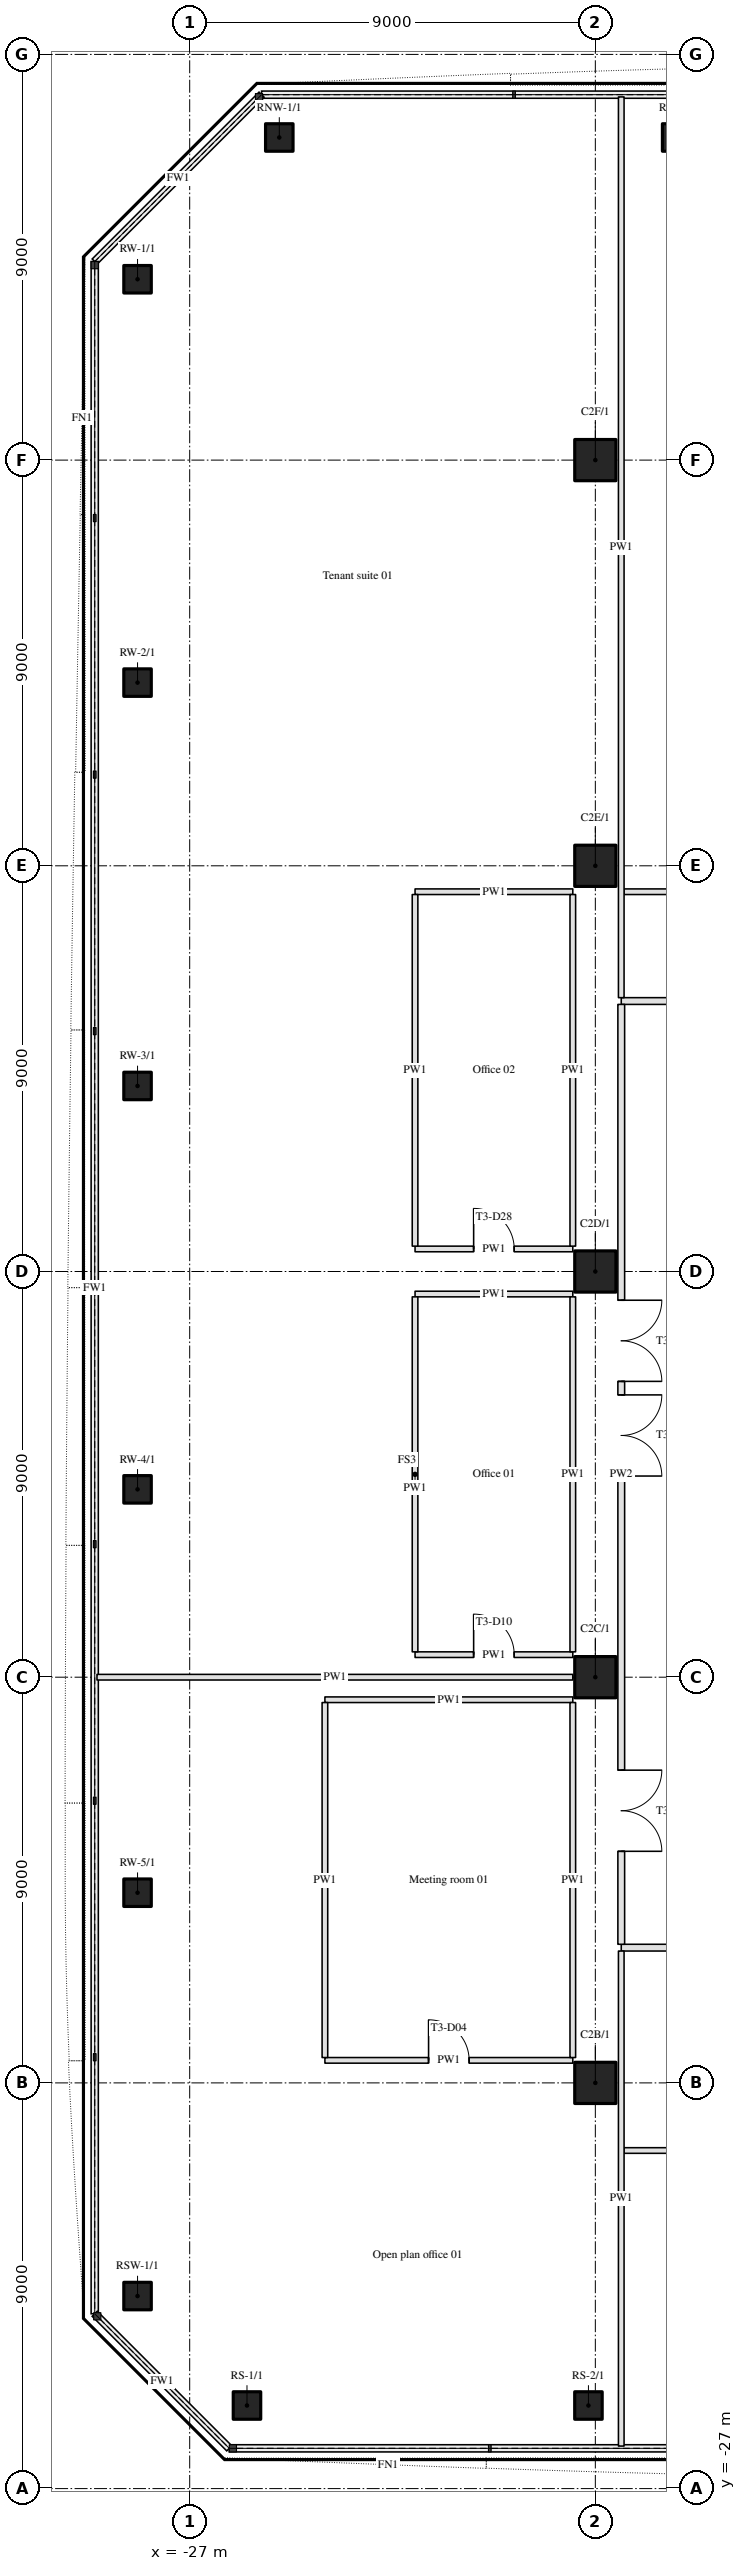
"""IFC4 building model, lengths in metres.
Left out: names, types, materials, properties, quantities, classifications, styles, units other than length and angle.
Written with IfcOpenShell. Run it as: python <this file> out.ifc"""

import sys

from ifc_helpers import new_model, si_unit, direction, frame, frame_2d, origin, origin_2d, place, context, subcontext, project, spatial, rectangle, hollow_circle, extrude, element, fill, save


model = new_model("IFC4")
c1 = context("Model", 3, precision=1e-05, world=origin(), true_north=direction((0.0, 1.0)))
c2 = subcontext(c1, "Body", "Model", "MODEL_VIEW")
j1 = project(units=[si_unit("LENGTHUNIT", "METRE"), si_unit("PLANEANGLEUNIT", "RADIAN")], contexts=[c1])
p1 = place(None, origin())
s1 = spatial("IfcSite", under=j1, at=p1, CompositionType="ELEMENT")
p2 = place(p1, origin())
s2 = spatial("IfcBuilding", under=s1, at=p2, CompositionType="ELEMENT")
p3 = place(p2, frame((0.0, 0.0, 53.7)))
s3 = spatial("IfcBuildingStorey", under=s2, at=p3, CompositionType="ELEMENT", Elevation=53.7)
for number, where, z_axis, x_axis in (
    (1, (-18.0, -18.0, 0.0), (0.0, 0.0, 1.0), (1.0, 0.0, 0.0)),
    (2, (-18.0, -9.0, 0.0), (0.0, 0.0, 1.0), (1.0, 0.0, 0.0)),
    (3, (-18.0, 0.0, 0.0), (0.0, 0.0, 1.0), (1.0, 0.0, 0.0)),
    (4, (-18.0, 9.0, 0.0), (0.0, 0.0, 1.0), (1.0, 0.0, 0.0)),
    (5, (-18.0, 18.0, 0.0), (0.0, 0.0, 1.0), (1.0, 0.0, 0.0)),
):
    element("IfcColumn", number, at=place(p3, frame(where, z_axis=z_axis, x_axis=x_axis)), inside=s3, PredefinedType="COLUMN", context=c2, shape_type="SweptSolid", body=[
        extrude(hollow_circle(Radius=0.457, WallThickness=0.05, at=origin_2d()), origin(), (0.0, 0.0, 1.0), 3.9),
    ])
for number, where, z_axis, x_axis in (
    (6, (-25.729, -25.157, 0.0), (0.0, 0.0, 1.0), (1.0, 0.0, 0.0)),
    (7, (-18.153, -25.157, 0.0), (0.0, 0.0, 1.0), (1.0, 0.0, 0.0)),
    (8, (-16.207, 25.157, 0.0), (0.0, 0.0, 1.0), (1.0, 0.0, 0.0)),
    (9, (-25.012, 25.157, 0.0), (0.0, 0.0, 1.0), (1.0, 0.0, 0.0)),
    (10, (-28.157, 22.012, 0.0), (0.0, 0.0, 1.0), (1.0, 0.0, 0.0)),
    (11, (-28.157, 13.064, 0.0), (0.0, 0.0, 1.0), (1.0, 0.0, 0.0)),
    (12, (-28.157, 4.116, 0.0), (0.0, 0.0, 1.0), (1.0, 0.0, 0.0)),
    (13, (-28.157, -4.833, 0.0), (0.0, 0.0, 1.0), (1.0, 0.0, 0.0)),
    (14, (-28.157, -13.781, 0.0), (0.0, 0.0, 1.0), (1.0, 0.0, 0.0)),
    (15, (-28.157, -22.729, 0.0), (0.0, 0.0, 1.0), (1.0, 0.0, 0.0)),
):
    element("IfcColumn", number, at=place(p3, frame(where, z_axis=z_axis, x_axis=x_axis)), inside=s3, PredefinedType="COLUMN", context=c2, shape_type="SweptSolid", body=[
        extrude(hollow_circle(Radius=0.305, WallThickness=0.03, at=origin_2d()), origin(), (0.0, 0.0, 1.0), 3.9),
    ])
p4 = place(p3, frame((-17.363, -19.5, 0.0), z_axis=(0.0, 0.0, 1.0), x_axis=(1.0, 0.0, 0.0)))
e16 = element("IfcWall", 16, at=p4, inside=s3, PredefinedType="PARTITIONING", context=c2, shape_type="SweptSolid", body=[
    extrude(rectangle(XDim=7.863, YDim=0.125, at=frame_2d((3.931, 0.0))), origin(), (0.0, 0.0, 1.0), 2.96),
])
p5 = place(p4, frame((3.481, 0.0, 0.0)))
e17 = element("IfcOpeningElement", 17, at=p5, cuts=e16, PredefinedType="OPENING", context=c2, shape_type="SweptSolid", body=[
    extrude(rectangle(XDim=0.9, YDim=2.1, at=frame_2d((0.45, 1.05))), frame((0.0, 0.073, 0.0), z_axis=(0.0, -1.0, 0.0), x_axis=(1.0, 0.0, 0.0)), (0.0, 0.0, 1.0), 0.145),
])
p6 = place(p3, frame((-24.0, -17.5, 0.0), z_axis=(0.0, 0.0, 1.0), x_axis=(1.0, 0.0, 0.0)))
e18 = element("IfcWall", 18, at=p6, inside=s3, PredefinedType="PARTITIONING", context=c2, shape_type="SweptSolid", body=[
    extrude(rectangle(XDim=5.5, YDim=0.125, at=frame_2d((2.75, 0.0))), origin(), (0.0, 0.0, 1.0), 2.96),
])
p7 = place(p6, frame((2.3, 0.0, 0.0)))
e19 = element("IfcOpeningElement", 19, at=p7, cuts=e18, PredefinedType="OPENING", context=c2, shape_type="SweptSolid", body=[
    extrude(rectangle(XDim=0.9, YDim=2.1, at=frame_2d((0.45, 1.05))), frame((0.0, 0.073, 0.0), z_axis=(0.0, -1.0, 0.0), x_axis=(1.0, 0.0, 0.0)), (0.0, 0.0, 1.0), 0.145),
])
p8 = place(p3, frame((-17.425, -15.0, 0.0), z_axis=(0.0, 0.0, 1.0), x_axis=(1.0, 0.0, 0.0)))
e20 = element("IfcWall", 20, at=p8, inside=s3, PredefinedType="PARTITIONING", context=c2, shape_type="SweptSolid", body=[
    extrude(rectangle(XDim=34.85, YDim=0.15, at=frame_2d((17.425, 0.0))), origin(), (0.0, 0.0, 1.0), 2.96),
])
p9 = place(p8, frame((25.238, 0.0, 0.0)))
e21 = element("IfcOpeningElement", 21, at=p9, cuts=e20, PredefinedType="OPENING", context=c2, shape_type="SweptSolid", body=[
    extrude(rectangle(XDim=1.8, YDim=2.1, at=frame_2d((0.9, 1.05))), frame((0.0, 0.085, 0.0), z_axis=(0.0, -1.0, 0.0), x_axis=(1.0, 0.0, 0.0)), (0.0, 0.0, 1.0), 0.17),
])
p10 = place(p8, frame((23.137, 0.0, 0.0)))
e22 = element("IfcOpeningElement", 22, at=p10, cuts=e20, PredefinedType="OPENING", context=c2, shape_type="SweptSolid", body=[
    extrude(rectangle(XDim=1.8, YDim=2.1, at=frame_2d((0.9, 1.05))), frame((0.0, 0.085, 0.0), z_axis=(0.0, -1.0, 0.0), x_axis=(1.0, 0.0, 0.0)), (0.0, 0.0, 1.0), 0.17),
])
p11 = place(p3, frame((-24.0, -9.5, 0.0), z_axis=(0.0, 0.0, 1.0), x_axis=(1.0, 0.0, 0.0)))
e23 = element("IfcWall", 23, at=p11, inside=s3, PredefinedType="PARTITIONING", context=c2, shape_type="SweptSolid", body=[
    extrude(rectangle(XDim=5.5, YDim=0.125, at=frame_2d((2.75, 0.0))), origin(), (0.0, 0.0, 1.0), 2.96),
])
p12 = place(p3, frame((-29.057, -9.0, 0.0), z_axis=(0.0, 0.0, 1.0), x_axis=(1.0, 0.0, 0.0)))
e24 = element("IfcWall", 24, at=p12, inside=s3, PredefinedType="PARTITIONING", context=c2, shape_type="SweptSolid", body=[
    extrude(rectangle(XDim=10.557, YDim=0.125, at=frame_2d((5.278, 0.0))), origin(), (0.0, 0.0, 1.0), 2.96),
])
p13 = place(p3, frame((-22.0, -8.5, 0.0), z_axis=(0.0, 0.0, 1.0), x_axis=(1.0, 0.0, 0.0)))
e25 = element("IfcWall", 25, at=p13, inside=s3, PredefinedType="PARTITIONING", context=c2, shape_type="SweptSolid", body=[
    extrude(rectangle(XDim=3.5, YDim=0.125, at=frame_2d((1.75, 0.0))), origin(), (0.0, 0.0, 1.0), 2.96),
])
p14 = place(p13, frame((1.3, 0.0, 0.0)))
e26 = element("IfcOpeningElement", 26, at=p14, cuts=e25, PredefinedType="OPENING", context=c2, shape_type="SweptSolid", body=[
    extrude(rectangle(XDim=0.9, YDim=2.1, at=frame_2d((0.45, 1.05))), frame((0.0, 0.073, 0.0), z_axis=(0.0, -1.0, 0.0), x_axis=(1.0, 0.0, 0.0)), (0.0, 0.0, 1.0), 0.145),
])
p15 = place(p3, frame((-22.0, -0.5, 0.0), z_axis=(0.0, 0.0, 1.0), x_axis=(1.0, 0.0, 0.0)))
e27 = element("IfcWall", 27, at=p15, inside=s3, PredefinedType="PARTITIONING", context=c2, shape_type="SweptSolid", body=[
    extrude(rectangle(XDim=3.5, YDim=0.125, at=frame_2d((1.75, 0.0))), origin(), (0.0, 0.0, 1.0), 2.96),
])
p16 = place(p3, frame((-22.0, 0.5, 0.0), z_axis=(0.0, 0.0, 1.0), x_axis=(1.0, 0.0, 0.0)))
e28 = element("IfcWall", 28, at=p16, inside=s3, PredefinedType="PARTITIONING", context=c2, shape_type="SweptSolid", body=[
    extrude(rectangle(XDim=3.5, YDim=0.125, at=frame_2d((1.75, 0.0))), origin(), (0.0, 0.0, 1.0), 2.96),
])
p17 = place(p16, frame((1.3, 0.0, 0.0)))
e29 = element("IfcOpeningElement", 29, at=p17, cuts=e28, PredefinedType="OPENING", context=c2, shape_type="SweptSolid", body=[
    extrude(rectangle(XDim=0.9, YDim=2.1, at=frame_2d((0.45, 1.05))), frame((0.0, 0.073, 0.0), z_axis=(0.0, -1.0, 0.0), x_axis=(1.0, 0.0, 0.0)), (0.0, 0.0, 1.0), 0.145),
])
p18 = place(p3, frame((-7.35, 6.0, 0.0), z_axis=(0.0, 0.0, 1.0), x_axis=(-1.0, 0.0, 0.0)))
e30 = element("IfcWall", 30, at=p18, inside=s3, PredefinedType="PARTITIONING", context=c2, shape_type="SweptSolid", body=[
    extrude(rectangle(XDim=10.075, YDim=0.15, at=frame_2d((5.038, 0.0))), origin(), (0.0, 0.0, 1.0), 2.96),
])
p19 = place(p18, frame((2.325, 0.0, 0.0)))
e31 = element("IfcOpeningElement", 31, at=p19, cuts=e30, PredefinedType="OPENING", context=c2, shape_type="SweptSolid", body=[
    extrude(rectangle(XDim=1.0, YDim=2.1, at=frame_2d((0.5, 1.05))), frame((0.0, 0.085, 0.0), z_axis=(0.0, -1.0, 0.0), x_axis=(1.0, 0.0, 0.0)), (0.0, 0.0, 1.0), 0.17),
])
p20 = place(p18, frame((7.413, 0.0, 0.0)))
e32 = element("IfcOpeningElement", 32, at=p20, cuts=e30, PredefinedType="OPENING", context=c2, shape_type="SweptSolid", body=[
    extrude(rectangle(XDim=0.9, YDim=2.1, at=frame_2d((0.45, 1.05))), frame((0.0, 0.085, 0.0), z_axis=(0.0, -1.0, 0.0), x_axis=(1.0, 0.0, 0.0)), (0.0, 0.0, 1.0), 0.17),
])
p21 = place(p3, frame((-22.0, 8.425, 0.0), z_axis=(0.0, 0.0, 1.0), x_axis=(1.0, 0.0, 0.0)))
e33 = element("IfcWall", 33, at=p21, inside=s3, PredefinedType="PARTITIONING", context=c2, shape_type="SweptSolid", body=[
    extrude(rectangle(XDim=3.5, YDim=0.125, at=frame_2d((1.75, 0.0))), origin(), (0.0, 0.0, 1.0), 2.96),
])
p22 = place(p3, frame((-17.363, 8.425, 0.0), z_axis=(0.0, 0.0, 1.0), x_axis=(1.0, 0.0, 0.0)))
e34 = element("IfcWall", 34, at=p22, inside=s3, PredefinedType="PARTITIONING", context=c2, shape_type="SweptSolid", body=[
    extrude(rectangle(XDim=4.288, YDim=0.125, at=frame_2d((2.144, 0.0))), origin(), (0.0, 0.0, 1.0), 2.96),
])
for number, where, z_axis, x_axis in (
    (35, (-24.0, -17.438, 0.0), (0.0, 0.0, 1.0), (0.0, 1.0, 0.0)),
    (36, (-22.0, -8.438, 0.0), (0.0, 0.0, 1.0), (0.0, 1.0, 0.0)),
):
    element("IfcWall", number, at=place(p3, frame(where, z_axis=z_axis, x_axis=x_axis)), inside=s3, PredefinedType="PARTITIONING", context=c2, shape_type="SweptSolid", body=[
        extrude(rectangle(XDim=7.875, YDim=0.125, at=frame_2d((3.938, 0.0))), origin(), (0.0, 0.0, 1.0), 2.96),
    ])
p23 = place(p3, frame((-22.0, 0.562, 0.0), z_axis=(0.0, 0.0, 1.0), x_axis=(0.0, 1.0, 0.0)))
e37 = element("IfcWall", 37, at=p23, inside=s3, PredefinedType="PARTITIONING", context=c2, shape_type="SweptSolid", body=[
    extrude(rectangle(XDim=7.8, YDim=0.125, at=frame_2d((3.9, 0.0))), origin(), (0.0, 0.0, 1.0), 2.96),
])
for number, where, z_axis, x_axis in (
    (38, (-18.5, -17.438, 0.0), (0.0, 0.0, 1.0), (0.0, 1.0, 0.0)),
    (39, (-18.5, -8.438, 0.0), (0.0, 0.0, 1.0), (0.0, 1.0, 0.0)),
):
    element("IfcWall", number, at=place(p3, frame(where, z_axis=z_axis, x_axis=x_axis)), inside=s3, PredefinedType="PARTITIONING", context=c2, shape_type="SweptSolid", body=[
        extrude(rectangle(XDim=7.875, YDim=0.125, at=frame_2d((3.938, 0.0))), origin(), (0.0, 0.0, 1.0), 2.96),
    ])
p24 = place(p3, frame((-18.5, 0.562, 0.0), z_axis=(0.0, 0.0, 1.0), x_axis=(0.0, 1.0, 0.0)))
e40 = element("IfcWall", 40, at=p24, inside=s3, PredefinedType="PARTITIONING", context=c2, shape_type="SweptSolid", body=[
    extrude(rectangle(XDim=7.8, YDim=0.125, at=frame_2d((3.9, 0.0))), origin(), (0.0, 0.0, 1.0), 2.96),
])
p25 = place(p3, frame((-17.425, -26.057, 0.0), z_axis=(0.0, 0.0, 1.0), x_axis=(0.0, 1.0, 0.0)))
e41 = element("IfcWall", 41, at=p25, inside=s3, PredefinedType="PARTITIONING", context=c2, shape_type="SweptSolid", body=[
    extrude(rectangle(XDim=10.982, YDim=0.125, at=frame_2d((5.491, 0.0))), origin(), (0.0, 0.0, 1.0), 2.96),
])
p26 = place(p3, frame((-17.425, 5.925, 0.0), z_axis=(0.0, 0.0, 1.0), x_axis=(0.0, -1.0, 0.0)))
e42 = element("IfcWall", 42, at=p26, inside=s3, PredefinedType="PARTITIONING", context=c2, shape_type="SweptSolid", body=[
    extrude(rectangle(XDim=20.85, YDim=0.15, at=frame_2d((10.425, 0.0))), origin(), (0.0, 0.0, 1.0), 2.96),
])
p27 = place(p26, frame((16.988, 0.0, 0.0)))
e43 = element("IfcOpeningElement", 43, at=p27, cuts=e42, PredefinedType="OPENING", context=c2, shape_type="SweptSolid", body=[
    extrude(rectangle(XDim=1.8, YDim=2.1, at=frame_2d((0.9, 1.05))), frame((0.0, 0.085, 0.0), z_axis=(0.0, -1.0, 0.0), x_axis=(1.0, 0.0, 0.0)), (0.0, 0.0, 1.0), 0.17),
])
p28 = place(p26, frame((6.562, 0.0, 0.0)))
e44 = element("IfcOpeningElement", 44, at=p28, cuts=e42, PredefinedType="OPENING", context=c2, shape_type="SweptSolid", body=[
    extrude(rectangle(XDim=1.8, YDim=2.1, at=frame_2d((0.9, 1.05))), frame((0.0, 0.085, 0.0), z_axis=(0.0, -1.0, 0.0), x_axis=(1.0, 0.0, 0.0)), (0.0, 0.0, 1.0), 0.17),
])
p29 = place(p26, frame((8.663, 0.0, 0.0)))
e45 = element("IfcOpeningElement", 45, at=p29, cuts=e42, PredefinedType="OPENING", context=c2, shape_type="SweptSolid", body=[
    extrude(rectangle(XDim=1.8, YDim=2.1, at=frame_2d((0.9, 1.05))), frame((0.0, 0.085, 0.0), z_axis=(0.0, -1.0, 0.0), x_axis=(1.0, 0.0, 0.0)), (0.0, 0.0, 1.0), 0.17),
])
p30 = place(p3, frame((-17.425, 6.075, 0.0), z_axis=(0.0, 0.0, 1.0), x_axis=(0.0, 1.0, 0.0)))
e46 = element("IfcWall", 46, at=p30, inside=s3, PredefinedType="PARTITIONING", context=c2, shape_type="SweptSolid", body=[
    extrude(rectangle(XDim=19.982, YDim=0.125, at=frame_2d((9.991, 0.0))), origin(), (0.0, 0.0, 1.0), 2.96),
])
p31 = place(p27, origin())
e47 = element("IfcDoor", 47, at=p31, inside=s3, OperationType="DOUBLE_DOOR_SINGLE_SWING", PredefinedType="DOOR", context=c2, shape_type="SweptSolid", body=[
    extrude(rectangle(XDim=1.8, YDim=2.1, at=frame_2d((0.9, 1.05))), frame((0.0, 0.025, 0.0), z_axis=(0.0, -1.0, 0.0), x_axis=(1.0, 0.0, 0.0)), (0.0, 0.0, 1.0), 0.05),
])
fill(e43, e47)
p32 = place(p28, origin())
e48 = element("IfcDoor", 48, at=p32, inside=s3, OperationType="DOUBLE_DOOR_SINGLE_SWING", PredefinedType="DOOR", context=c2, shape_type="SweptSolid", body=[
    extrude(rectangle(XDim=1.8, YDim=2.1, at=frame_2d((0.9, 1.05))), frame((0.0, 0.025, 0.0), z_axis=(0.0, -1.0, 0.0), x_axis=(1.0, 0.0, 0.0)), (0.0, 0.0, 1.0), 0.05),
])
fill(e44, e48)
p33 = place(p29, origin())
e49 = element("IfcDoor", 49, at=p33, inside=s3, OperationType="DOUBLE_DOOR_SINGLE_SWING", PredefinedType="DOOR", context=c2, shape_type="SweptSolid", body=[
    extrude(rectangle(XDim=1.8, YDim=2.1, at=frame_2d((0.9, 1.05))), frame((0.0, 0.025, 0.0), z_axis=(0.0, -1.0, 0.0), x_axis=(1.0, 0.0, 0.0)), (0.0, 0.0, 1.0), 0.05),
])
fill(e45, e49)
p34 = place(p7, origin())
e50 = element("IfcDoor", 50, at=p34, inside=s3, OperationType="SINGLE_SWING_LEFT", PredefinedType="DOOR", context=c2, shape_type="SweptSolid", body=[
    extrude(rectangle(XDim=0.9, YDim=2.1, at=frame_2d((0.45, 1.05))), frame((0.0, 0.025, 0.0), z_axis=(0.0, -1.0, 0.0), x_axis=(1.0, 0.0, 0.0)), (0.0, 0.0, 1.0), 0.05),
])
fill(e19, e50)
p35 = place(p14, origin())
e51 = element("IfcDoor", 51, at=p35, inside=s3, OperationType="SINGLE_SWING_LEFT", PredefinedType="DOOR", context=c2, shape_type="SweptSolid", body=[
    extrude(rectangle(XDim=0.9, YDim=2.1, at=frame_2d((0.45, 1.05))), frame((0.0, 0.025, 0.0), z_axis=(0.0, -1.0, 0.0), x_axis=(1.0, 0.0, 0.0)), (0.0, 0.0, 1.0), 0.05),
])
fill(e26, e51)
p36 = place(p17, origin())
e52 = element("IfcDoor", 52, at=p36, inside=s3, OperationType="SINGLE_SWING_LEFT", PredefinedType="DOOR", context=c2, shape_type="SweptSolid", body=[
    extrude(rectangle(XDim=0.9, YDim=2.1, at=frame_2d((0.45, 1.05))), frame((0.0, 0.025, 0.0), z_axis=(0.0, -1.0, 0.0), x_axis=(1.0, 0.0, 0.0)), (0.0, 0.0, 1.0), 0.05),
])
fill(e29, e52)
save(model, sys.argv[1])
